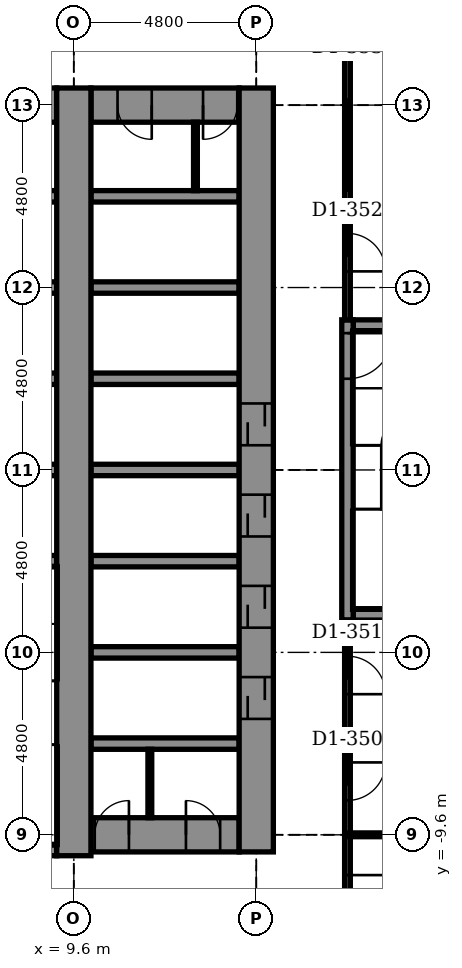
"""IFC4 building model, lengths in metres.
Left out: names, types, materials, properties, quantities, classifications, styles, units other than length and angle.
Written with IfcOpenShell. Run it as: python <this file> out.ifc"""

import sys

from ifc_helpers import new_model, si_unit, direction, frame, frame_2d, origin, place, context, subcontext, project, spatial, rectangle, extrude, element, fill, save


model = new_model("IFC4")
c1 = context("Model", 3, precision=1e-05, world=origin(), true_north=direction((0.0, 1.0)))
c2 = subcontext(c1, "Body", "Model", "MODEL_VIEW")
j1 = project(units=[si_unit("LENGTHUNIT", "METRE"), si_unit("PLANEANGLEUNIT", "RADIAN")], contexts=[c1])
p1 = place(None, origin())
s1 = spatial("IfcSite", under=j1, at=p1, CompositionType="ELEMENT")
p2 = place(p1, origin())
s2 = spatial("IfcBuilding", under=s1, at=p2, CompositionType="ELEMENT")
p3 = place(p2, frame((0.0, 0.0, 122.9)))
s3 = spatial("IfcBuildingStorey", under=s2, at=p3, CompositionType="ELEMENT", Elevation=122.9)
p4 = place(p3, frame((4.95, -10.0, -0.2), z_axis=(0.0, 0.0, 1.0), x_axis=(1.0, 0.0, 0.0)))
e1 = element("IfcWall", 1, at=p4, inside=s3, PredefinedType="STANDARD", context=c2, shape_type="SweptSolid", body=[
    extrude(rectangle(XDim=4.2, YDim=0.3, at=frame_2d((2.1, 0.0))), origin(), (0.0, 0.0, 1.0), 4.4),
])
p5 = place(p3, frame((10.05, -9.6, -0.2), z_axis=(0.0, 0.0, 1.0), x_axis=(1.0, 0.0, 0.0)))
e2 = element("IfcWall", 2, at=p5, inside=s3, PredefinedType="SHEAR", context=c2, shape_type="SweptSolid", body=[
    extrude(rectangle(XDim=3.9, YDim=0.9, at=frame_2d((1.95, 0.0))), origin(), (0.0, 0.0, 1.0), 4.4),
])
p6 = place(p5, frame((0.1, 0.0, 0.2)))
e3 = element("IfcOpeningElement", 3, at=p6, cuts=e2, PredefinedType="OPENING", context=c2, shape_type="SweptSolid", body=[
    extrude(rectangle(XDim=0.9, YDim=2.1, at=frame_2d((0.45, 1.05))), frame((0.0, 0.46, 0.0), z_axis=(0.0, -1.0, 0.0), x_axis=(1.0, 0.0, 0.0)), (0.0, 0.0, 1.0), 0.92),
])
p7 = place(p5, frame((2.5, 0.0, 0.2)))
e4 = element("IfcOpeningElement", 4, at=p7, cuts=e2, PredefinedType="OPENING", context=c2, shape_type="SweptSolid", body=[
    extrude(rectangle(XDim=0.9, YDim=2.1, at=frame_2d((0.45, 1.05))), frame((0.0, 0.46, 0.0), z_axis=(0.0, -1.0, 0.0), x_axis=(1.0, 0.0, 0.0)), (0.0, 0.0, 1.0), 0.92),
])
for number, where, z_axis, x_axis in (
    (5, (10.05, -7.2, -0.2), (0.0, 0.0, 1.0), (1.0, 0.0, 0.0)),
    (6, (10.05, -4.8, -0.2), (0.0, 0.0, 1.0), (1.0, 0.0, 0.0)),
):
    element("IfcWall", number, at=place(p3, frame(where, z_axis=z_axis, x_axis=x_axis)), inside=s3, PredefinedType="STANDARD", context=c2, shape_type="SweptSolid", body=[
        extrude(rectangle(XDim=3.9, YDim=0.3, at=frame_2d((1.95, 0.0))), origin(), (0.0, 0.0, 1.0), 4.4),
    ])
p8 = place(p3, frame((16.95, -3.8, -0.2), z_axis=(0.0, 0.0, 1.0), x_axis=(1.0, 0.0, 0.0)))
e7 = element("IfcWall", 7, at=p8, inside=s3, PredefinedType="STANDARD", context=c2, shape_type="SweptSolid", body=[
    extrude(rectangle(XDim=4.5, YDim=0.3, at=frame_2d((2.25, 0.0))), origin(), (0.0, 0.0, 1.0), 4.4),
])
p9 = place(p3, frame((6.15, -2.4, -0.2), z_axis=(0.0, 0.0, 1.0), x_axis=(1.0, 0.0, 0.0)))
e8 = element("IfcWall", 8, at=p9, inside=s3, PredefinedType="STANDARD", context=c2, shape_type="SweptSolid", body=[
    extrude(rectangle(XDim=3.0, YDim=0.3, at=frame_2d((1.5, 0.0))), origin(), (0.0, 0.0, 1.0), 4.4),
])
p10 = place(p3, frame((10.05, -2.4, -0.2), z_axis=(0.0, 0.0, 1.0), x_axis=(1.0, 0.0, 0.0)))
e9 = element("IfcWall", 9, at=p10, inside=s3, PredefinedType="STANDARD", context=c2, shape_type="SweptSolid", body=[
    extrude(rectangle(XDim=3.9, YDim=0.3, at=frame_2d((1.95, 0.0))), origin(), (0.0, 0.0, 1.0), 4.4),
])
p11 = place(p3, frame((6.15, 0.0, -0.2), z_axis=(0.0, 0.0, 1.0), x_axis=(1.0, 0.0, 0.0)))
e10 = element("IfcWall", 10, at=p11, inside=s3, PredefinedType="STANDARD", context=c2, shape_type="SweptSolid", body=[
    extrude(rectangle(XDim=3.0, YDim=0.3, at=frame_2d((1.5, 0.0))), origin(), (0.0, 0.0, 1.0), 4.4),
])
p12 = place(p3, frame((10.05, 0.0, -0.2), z_axis=(0.0, 0.0, 1.0), x_axis=(1.0, 0.0, 0.0)))
e11 = element("IfcWall", 11, at=p12, inside=s3, PredefinedType="STANDARD", context=c2, shape_type="SweptSolid", body=[
    extrude(rectangle(XDim=3.9, YDim=0.3, at=frame_2d((1.95, 0.0))), origin(), (0.0, 0.0, 1.0), 4.4),
])
p13 = place(p3, frame((6.15, 2.4, -0.2), z_axis=(0.0, 0.0, 1.0), x_axis=(1.0, 0.0, 0.0)))
e12 = element("IfcWall", 12, at=p13, inside=s3, PredefinedType="STANDARD", context=c2, shape_type="SweptSolid", body=[
    extrude(rectangle(XDim=3.0, YDim=0.3, at=frame_2d((1.5, 0.0))), origin(), (0.0, 0.0, 1.0), 4.4),
])
p14 = place(p3, frame((10.05, 2.4, -0.2), z_axis=(0.0, 0.0, 1.0), x_axis=(1.0, 0.0, 0.0)))
e13 = element("IfcWall", 13, at=p14, inside=s3, PredefinedType="STANDARD", context=c2, shape_type="SweptSolid", body=[
    extrude(rectangle(XDim=3.9, YDim=0.3, at=frame_2d((1.95, 0.0))), origin(), (0.0, 0.0, 1.0), 4.4),
])
p15 = place(p3, frame((16.95, 3.8, -0.2), z_axis=(0.0, 0.0, 1.0), x_axis=(1.0, 0.0, 0.0)))
e14 = element("IfcWall", 14, at=p15, inside=s3, PredefinedType="STANDARD", context=c2, shape_type="SweptSolid", body=[
    extrude(rectangle(XDim=4.5, YDim=0.3, at=frame_2d((2.25, 0.0))), origin(), (0.0, 0.0, 1.0), 4.4),
])
p16 = place(p3, frame((6.15, 4.8, -0.2), z_axis=(0.0, 0.0, 1.0), x_axis=(1.0, 0.0, 0.0)))
e15 = element("IfcWall", 15, at=p16, inside=s3, PredefinedType="STANDARD", context=c2, shape_type="SweptSolid", body=[
    extrude(rectangle(XDim=3.0, YDim=0.3, at=frame_2d((1.5, 0.0))), origin(), (0.0, 0.0, 1.0), 4.4),
])
p17 = place(p3, frame((10.05, 4.8, -0.2), z_axis=(0.0, 0.0, 1.0), x_axis=(1.0, 0.0, 0.0)))
e16 = element("IfcWall", 16, at=p17, inside=s3, PredefinedType="STANDARD", context=c2, shape_type="SweptSolid", body=[
    extrude(rectangle(XDim=3.9, YDim=0.3, at=frame_2d((1.95, 0.0))), origin(), (0.0, 0.0, 1.0), 4.4),
])
p18 = place(p3, frame((6.0, 7.2, -0.2), z_axis=(0.0, 0.0, 1.0), x_axis=(1.0, 0.0, 0.0)))
e17 = element("IfcWall", 17, at=p18, inside=s3, PredefinedType="STANDARD", context=c2, shape_type="SweptSolid", body=[
    extrude(rectangle(XDim=3.15, YDim=0.3, at=frame_2d((1.575, 0.0))), origin(), (0.0, 0.0, 1.0), 4.4),
])
p19 = place(p3, frame((10.05, 7.2, -0.2), z_axis=(0.0, 0.0, 1.0), x_axis=(1.0, 0.0, 0.0)))
e18 = element("IfcWall", 18, at=p19, inside=s3, PredefinedType="STANDARD", context=c2, shape_type="SweptSolid", body=[
    extrude(rectangle(XDim=3.9, YDim=0.3, at=frame_2d((1.95, 0.0))), origin(), (0.0, 0.0, 1.0), 4.4),
])
p20 = place(p3, frame((-5.25, 9.6, -0.2), z_axis=(0.0, 0.0, 1.0), x_axis=(1.0, 0.0, 0.0)))
e19 = element("IfcWall", 19, at=p20, inside=s3, PredefinedType="SHEAR", context=c2, shape_type="SweptSolid", body=[
    extrude(rectangle(XDim=14.4, YDim=0.9, at=frame_2d((7.2, 0.0))), origin(), (0.0, 0.0, 1.0), 4.4),
])
p21 = place(p20, frame((0.6, 0.0, 0.2)))
e20 = element("IfcOpeningElement", 20, at=p21, cuts=e19, PredefinedType="OPENING", context=c2, shape_type="SweptSolid", body=[
    extrude(rectangle(XDim=0.9, YDim=2.1, at=frame_2d((0.45, 1.05))), frame((0.0, 0.46, 0.0), z_axis=(0.0, -1.0, 0.0), x_axis=(1.0, 0.0, 0.0)), (0.0, 0.0, 1.0), 0.92),
])
p22 = place(p3, frame((10.05, 9.6, -0.2), z_axis=(0.0, 0.0, 1.0), x_axis=(1.0, 0.0, 0.0)))
e21 = element("IfcWall", 21, at=p22, inside=s3, PredefinedType="SHEAR", context=c2, shape_type="SweptSolid", body=[
    extrude(rectangle(XDim=3.9, YDim=0.9, at=frame_2d((1.95, 0.0))), origin(), (0.0, 0.0, 1.0), 4.4),
])
p23 = place(p22, frame((0.7, 0.0, 0.2)))
e22 = element("IfcOpeningElement", 22, at=p23, cuts=e21, PredefinedType="OPENING", context=c2, shape_type="SweptSolid", body=[
    extrude(rectangle(XDim=0.9, YDim=2.1, at=frame_2d((0.45, 1.05))), frame((0.0, 0.46, 0.0), z_axis=(0.0, -1.0, 0.0), x_axis=(1.0, 0.0, 0.0)), (0.0, 0.0, 1.0), 0.92),
])
p24 = place(p22, frame((2.95, 0.0, 0.2)))
e23 = element("IfcOpeningElement", 23, at=p24, cuts=e21, PredefinedType="OPENING", context=c2, shape_type="SweptSolid", body=[
    extrude(rectangle(XDim=0.9, YDim=2.1, at=frame_2d((0.45, 1.05))), frame((0.0, 0.46, 0.0), z_axis=(0.0, -1.0, 0.0), x_axis=(1.0, 0.0, 0.0)), (0.0, 0.0, 1.0), 0.92),
])
p25 = place(p3, frame((9.6, -10.15, -0.2), z_axis=(0.0, 0.0, 1.0), x_axis=(0.0, 1.0, 0.0)))
e24 = element("IfcWall", 24, at=p25, inside=s3, PredefinedType="SHEAR", context=c2, shape_type="SweptSolid", body=[
    extrude(rectangle(XDim=20.2, YDim=0.9, at=frame_2d((10.1, 0.0))), origin(), (0.0, 0.0, 1.0), 4.4),
])
p26 = place(p3, frame((14.4, -10.05, -0.2), z_axis=(0.0, 0.0, 1.0), x_axis=(0.0, 1.0, 0.0)))
e25 = element("IfcWall", 25, at=p26, inside=s3, PredefinedType="SHEAR", context=c2, shape_type="SweptSolid", body=[
    extrude(rectangle(XDim=20.1, YDim=0.9, at=frame_2d((10.05, 0.0))), origin(), (0.0, 0.0, 1.0), 4.4),
])
p27 = place(p26, frame((3.5, 0.0, 0.2)))
e26 = element("IfcOpeningElement", 26, at=p27, cuts=e25, PredefinedType="OPENING", context=c2, shape_type="SweptSolid", body=[
    extrude(rectangle(XDim=1.1, YDim=2.1, at=frame_2d((0.55, 1.05))), frame((0.0, 0.46, 0.0), z_axis=(0.0, -1.0, 0.0), x_axis=(1.0, 0.0, 0.0)), (0.0, 0.0, 1.0), 0.92),
])
p28 = place(p26, frame((5.9, 0.0, 0.2)))
e27 = element("IfcOpeningElement", 27, at=p28, cuts=e25, PredefinedType="OPENING", context=c2, shape_type="SweptSolid", body=[
    extrude(rectangle(XDim=1.1, YDim=2.1, at=frame_2d((0.55, 1.05))), frame((0.0, 0.46, 0.0), z_axis=(0.0, -1.0, 0.0), x_axis=(1.0, 0.0, 0.0)), (0.0, 0.0, 1.0), 0.92),
])
p29 = place(p26, frame((8.3, 0.0, 0.2)))
e28 = element("IfcOpeningElement", 28, at=p29, cuts=e25, PredefinedType="OPENING", context=c2, shape_type="SweptSolid", body=[
    extrude(rectangle(XDim=1.1, YDim=2.1, at=frame_2d((0.55, 1.05))), frame((0.0, 0.46, 0.0), z_axis=(0.0, -1.0, 0.0), x_axis=(1.0, 0.0, 0.0)), (0.0, 0.0, 1.0), 0.92),
])
p30 = place(p26, frame((10.7, 0.0, 0.2)))
e29 = element("IfcOpeningElement", 29, at=p30, cuts=e25, PredefinedType="OPENING", context=c2, shape_type="SweptSolid", body=[
    extrude(rectangle(XDim=1.1, YDim=2.1, at=frame_2d((0.55, 1.05))), frame((0.0, 0.46, 0.0), z_axis=(0.0, -1.0, 0.0), x_axis=(1.0, 0.0, 0.0)), (0.0, 0.0, 1.0), 0.92),
])
p31 = place(p3, frame((16.8, -3.95, -0.2), z_axis=(0.0, 0.0, 1.0), x_axis=(0.0, 1.0, 0.0)))
e30 = element("IfcWall", 30, at=p31, inside=s3, PredefinedType="STANDARD", context=c2, shape_type="SweptSolid", body=[
    extrude(rectangle(XDim=7.9, YDim=0.3, at=frame_2d((3.95, 0.0))), origin(), (0.0, 0.0, 1.0), 4.4),
])
p32 = place(p31, frame((6.35, 0.0, 0.2)))
e31 = element("IfcOpeningElement", 31, at=p32, cuts=e30, PredefinedType="OPENING", context=c2, shape_type="SweptSolid", body=[
    extrude(rectangle(XDim=1.2, YDim=2.1, at=frame_2d((0.6, 1.05))), frame((0.0, 0.16, 0.0), z_axis=(0.0, -1.0, 0.0), x_axis=(1.0, 0.0, 0.0)), (0.0, 0.0, 1.0), 0.32),
])
p33 = place(p3, frame((16.8, -13.3, 0.0), z_axis=(0.0, 0.0, 1.0), x_axis=(0.0, 1.0, 0.0)))
e32 = element("IfcWall", 32, at=p33, inside=s3, PredefinedType="PARTITIONING", context=c2, shape_type="SweptSolid", body=[
    extrude(rectangle(XDim=9.35, YDim=0.15, at=frame_2d((4.675, 0.0))), origin(), (0.0, 0.0, 1.0), 4.2),
])
p34 = place(p33, frame((1.64, 0.0, 0.0)))
e33 = element("IfcOpeningElement", 33, at=p34, cuts=e32, PredefinedType="OPENING", context=c2, shape_type="SweptSolid", body=[
    extrude(rectangle(XDim=1.0, YDim=2.1, at=frame_2d((0.5, 1.05))), frame((0.0, 0.085, 0.0), z_axis=(0.0, -1.0, 0.0), x_axis=(1.0, 0.0, 0.0)), (0.0, 0.0, 1.0), 0.17),
])
p35 = place(p33, frame((4.605, 0.0, 0.0)))
e34 = element("IfcOpeningElement", 34, at=p35, cuts=e32, PredefinedType="OPENING", context=c2, shape_type="SweptSolid", body=[
    extrude(rectangle(XDim=1.0, YDim=2.1, at=frame_2d((0.5, 1.05))), frame((0.0, 0.085, 0.0), z_axis=(0.0, -1.0, 0.0), x_axis=(1.0, 0.0, 0.0)), (0.0, 0.0, 1.0), 0.17),
])
p36 = place(p33, frame((7.4, 0.0, 0.0)))
e35 = element("IfcOpeningElement", 35, at=p36, cuts=e32, PredefinedType="OPENING", context=c2, shape_type="SweptSolid", body=[
    extrude(rectangle(XDim=1.0, YDim=2.1, at=frame_2d((0.5, 1.05))), frame((0.0, 0.085, 0.0), z_axis=(0.0, -1.0, 0.0), x_axis=(1.0, 0.0, 0.0)), (0.0, 0.0, 1.0), 0.17),
])
p37 = place(p3, frame((16.8, 3.95, 0.0), z_axis=(0.0, 0.0, 1.0), x_axis=(0.0, 1.0, 0.0)))
e36 = element("IfcWall", 36, at=p37, inside=s3, PredefinedType="PARTITIONING", context=c2, shape_type="SweptSolid", body=[
    extrude(rectangle(XDim=9.35, YDim=0.15, at=frame_2d((4.675, 0.0))), origin(), (0.0, 0.0, 1.0), 4.2),
])
p38 = place(p37, frame((1.275, 0.0, 0.0)))
e37 = element("IfcOpeningElement", 37, at=p38, cuts=e36, PredefinedType="OPENING", context=c2, shape_type="SweptSolid", body=[
    extrude(rectangle(XDim=1.0, YDim=2.1, at=frame_2d((0.5, 1.05))), frame((0.0, 0.085, 0.0), z_axis=(0.0, -1.0, 0.0), x_axis=(1.0, 0.0, 0.0)), (0.0, 0.0, 1.0), 0.17),
])
p39 = place(p37, frame((7.76, 0.0, 0.0)))
e38 = element("IfcOpeningElement", 38, at=p39, cuts=e36, PredefinedType="OPENING", context=c2, shape_type="SweptSolid", body=[
    extrude(rectangle(XDim=1.0, YDim=2.1, at=frame_2d((0.5, 1.05))), frame((0.0, 0.085, 0.0), z_axis=(0.0, -1.0, 0.0), x_axis=(1.0, 0.0, 0.0)), (0.0, 0.0, 1.0), 0.17),
])
p40 = place(p37, frame((3.4, 0.0, 0.9)))
e39 = element("IfcOpeningElement", 39, at=p40, cuts=e36, PredefinedType="OPENING", context=c2, shape_type="SweptSolid", body=[
    extrude(rectangle(XDim=2.4, YDim=1.5, at=frame_2d((1.2, 0.75))), frame((0.0, 0.085, 0.0), z_axis=(0.0, -1.0, 0.0), x_axis=(1.0, 0.0, 0.0)), (0.0, 0.0, 1.0), 0.17),
])
for number, where, z_axis, x_axis in (
    (40, (12.8, 7.35, 0.0), (0.0, 0.0, 1.0), (0.0, 1.0, 0.0)),
    (41, (11.6, -9.15, 0.0), (0.0, 0.0, 1.0), (0.0, 1.0, 0.0)),
):
    element("IfcWall", number, at=place(p3, frame(where, z_axis=z_axis, x_axis=x_axis)), inside=s3, PredefinedType="PARTITIONING", context=c2, shape_type="SweptSolid", body=[
        extrude(rectangle(XDim=1.8, YDim=0.1, at=frame_2d((0.9, 0.0))), origin(), (0.0, 0.0, 1.0), 4.2),
    ])
p41 = place(p3, frame((16.8, -9.6, 0.0), z_axis=(0.0, 0.0, 1.0), x_axis=(1.0, 0.0, 0.0)))
e42 = element("IfcWall", 42, at=p41, inside=s3, PredefinedType="PARTITIONING", context=c2, shape_type="SweptSolid", body=[
    extrude(rectangle(XDim=1.9, YDim=0.1, at=frame_2d((0.95, 0.0))), origin(), (0.0, 0.0, 1.0), 3.592),
])
p42 = place(p3, frame((16.8, -7.0, 0.0), z_axis=(0.0, 0.0, 1.0), x_axis=(1.0, 0.0, 0.0)))
e43 = element("IfcWall", 43, at=p42, inside=s3, PredefinedType="PARTITIONING", context=c2, shape_type="SweptSolid", body=[
    extrude(rectangle(XDim=10.888, YDim=0.1, at=frame_2d((5.444, 0.0))), origin(), (0.0, 0.0, 1.0), 4.2),
])
p43 = place(p3, frame((16.8, 11.0, 0.0), z_axis=(0.0, 0.0, 1.0), x_axis=(1.0, 0.0, 0.0)))
e44 = element("IfcWall", 44, at=p43, inside=s3, PredefinedType="PARTITIONING", context=c2, shape_type="SweptSolid", body=[
    extrude(rectangle(XDim=8.578, YDim=0.1, at=frame_2d((4.289, 0.0))), origin(), (0.0, 0.0, 1.0), 4.2),
])
p44 = place(p34, frame((1.0, 0.0, 0.0), z_axis=(0.0, 0.0, 1.0), x_axis=(-1.0, 0.0, 0.0)))
e45 = element("IfcDoor", 45, at=p44, inside=s3, OperationType="SINGLE_SWING_RIGHT", PredefinedType="DOOR", context=c2, shape_type="SweptSolid", body=[
    extrude(rectangle(XDim=1.0, YDim=2.1, at=frame_2d((0.5, 1.05))), frame((0.0, 0.025, 0.0), z_axis=(0.0, -1.0, 0.0), x_axis=(1.0, 0.0, 0.0)), (0.0, 0.0, 1.0), 0.05),
])
fill(e33, e45)
p45 = place(p35, frame((1.0, 0.0, 0.0), z_axis=(0.0, 0.0, 1.0), x_axis=(-1.0, 0.0, 0.0)))
e46 = element("IfcDoor", 46, at=p45, inside=s3, OperationType="SINGLE_SWING_RIGHT", PredefinedType="DOOR", context=c2, shape_type="SweptSolid", body=[
    extrude(rectangle(XDim=1.0, YDim=2.1, at=frame_2d((0.5, 1.05))), frame((0.0, 0.025, 0.0), z_axis=(0.0, -1.0, 0.0), x_axis=(1.0, 0.0, 0.0)), (0.0, 0.0, 1.0), 0.05),
])
fill(e34, e46)
p46 = place(p36, frame((1.0, 0.0, 0.0), z_axis=(0.0, 0.0, 1.0), x_axis=(-1.0, 0.0, 0.0)))
e47 = element("IfcDoor", 47, at=p46, inside=s3, OperationType="SINGLE_SWING_LEFT", PredefinedType="DOOR", context=c2, shape_type="SweptSolid", body=[
    extrude(rectangle(XDim=1.0, YDim=2.1, at=frame_2d((0.5, 1.05))), frame((0.0, 0.025, 0.0), z_axis=(0.0, -1.0, 0.0), x_axis=(1.0, 0.0, 0.0)), (0.0, 0.0, 1.0), 0.05),
])
fill(e35, e47)
p47 = place(p38, frame((1.0, 0.0, 0.0), z_axis=(0.0, 0.0, 1.0), x_axis=(-1.0, 0.0, 0.0)))
e48 = element("IfcDoor", 48, at=p47, inside=s3, OperationType="SINGLE_SWING_LEFT", PredefinedType="DOOR", context=c2, shape_type="SweptSolid", body=[
    extrude(rectangle(XDim=1.0, YDim=2.1, at=frame_2d((0.5, 1.05))), frame((0.0, 0.025, 0.0), z_axis=(0.0, -1.0, 0.0), x_axis=(1.0, 0.0, 0.0)), (0.0, 0.0, 1.0), 0.05),
])
fill(e37, e48)
p48 = place(p27, origin())
e49 = element("IfcDoor", 49, at=p48, inside=s3, OperationType="DOUBLE_DOOR_SLIDING", PredefinedType="DOOR", context=c2, shape_type="SweptSolid", body=[
    extrude(rectangle(XDim=1.1, YDim=2.1, at=frame_2d((0.55, 1.05))), frame((0.0, 0.025, 0.0), z_axis=(0.0, -1.0, 0.0), x_axis=(1.0, 0.0, 0.0)), (0.0, 0.0, 1.0), 0.05),
])
fill(e26, e49)
p49 = place(p28, origin())
e50 = element("IfcDoor", 50, at=p49, inside=s3, OperationType="DOUBLE_DOOR_SLIDING", PredefinedType="DOOR", context=c2, shape_type="SweptSolid", body=[
    extrude(rectangle(XDim=1.1, YDim=2.1, at=frame_2d((0.55, 1.05))), frame((0.0, 0.025, 0.0), z_axis=(0.0, -1.0, 0.0), x_axis=(1.0, 0.0, 0.0)), (0.0, 0.0, 1.0), 0.05),
])
fill(e27, e50)
p50 = place(p29, origin())
e51 = element("IfcDoor", 51, at=p50, inside=s3, OperationType="DOUBLE_DOOR_SLIDING", PredefinedType="DOOR", context=c2, shape_type="SweptSolid", body=[
    extrude(rectangle(XDim=1.1, YDim=2.1, at=frame_2d((0.55, 1.05))), frame((0.0, 0.025, 0.0), z_axis=(0.0, -1.0, 0.0), x_axis=(1.0, 0.0, 0.0)), (0.0, 0.0, 1.0), 0.05),
])
fill(e28, e51)
p51 = place(p30, origin())
e52 = element("IfcDoor", 52, at=p51, inside=s3, OperationType="DOUBLE_DOOR_SLIDING", PredefinedType="DOOR", context=c2, shape_type="SweptSolid", body=[
    extrude(rectangle(XDim=1.1, YDim=2.1, at=frame_2d((0.55, 1.05))), frame((0.0, 0.025, 0.0), z_axis=(0.0, -1.0, 0.0), x_axis=(1.0, 0.0, 0.0)), (0.0, 0.0, 1.0), 0.05),
])
fill(e29, e52)
p52 = place(p32, frame((1.2, 0.0, 0.0), z_axis=(0.0, 0.0, 1.0), x_axis=(-1.0, 0.0, 0.0)))
e53 = element("IfcDoor", 53, at=p52, inside=s3, OperationType="SINGLE_SWING_RIGHT", PredefinedType="DOOR", context=c2, shape_type="SweptSolid", body=[
    extrude(rectangle(XDim=1.2, YDim=2.1, at=frame_2d((0.6, 1.05))), frame((0.0, 0.025, 0.0), z_axis=(0.0, -1.0, 0.0), x_axis=(1.0, 0.0, 0.0)), (0.0, 0.0, 1.0), 0.05),
])
fill(e31, e53)
p53 = place(p6, origin())
e54 = element("IfcDoor", 54, at=p53, inside=s3, OperationType="SINGLE_SWING_RIGHT", PredefinedType="DOOR", context=c2, shape_type="SweptSolid", body=[
    extrude(rectangle(XDim=0.9, YDim=2.1, at=frame_2d((0.45, 1.05))), frame((0.0, 0.025, 0.0), z_axis=(0.0, -1.0, 0.0), x_axis=(1.0, 0.0, 0.0)), (0.0, 0.0, 1.0), 0.05),
])
fill(e3, e54)
p54 = place(p7, origin())
e55 = element("IfcDoor", 55, at=p54, inside=s3, OperationType="SINGLE_SWING_LEFT", PredefinedType="DOOR", context=c2, shape_type="SweptSolid", body=[
    extrude(rectangle(XDim=0.9, YDim=2.1, at=frame_2d((0.45, 1.05))), frame((0.0, 0.025, 0.0), z_axis=(0.0, -1.0, 0.0), x_axis=(1.0, 0.0, 0.0)), (0.0, 0.0, 1.0), 0.05),
])
fill(e4, e55)
p55 = place(p23, frame((0.9, 0.0, 0.0), z_axis=(0.0, 0.0, 1.0), x_axis=(-1.0, 0.0, 0.0)))
e56 = element("IfcDoor", 56, at=p55, inside=s3, OperationType="SINGLE_SWING_RIGHT", PredefinedType="DOOR", context=c2, shape_type="SweptSolid", body=[
    extrude(rectangle(XDim=0.9, YDim=2.1, at=frame_2d((0.45, 1.05))), frame((0.0, 0.025, 0.0), z_axis=(0.0, -1.0, 0.0), x_axis=(1.0, 0.0, 0.0)), (0.0, 0.0, 1.0), 0.05),
])
fill(e22, e56)
p56 = place(p24, frame((0.9, 0.0, 0.0), z_axis=(0.0, 0.0, 1.0), x_axis=(-1.0, 0.0, 0.0)))
e57 = element("IfcDoor", 57, at=p56, inside=s3, OperationType="SINGLE_SWING_LEFT", PredefinedType="DOOR", context=c2, shape_type="SweptSolid", body=[
    extrude(rectangle(XDim=0.9, YDim=2.1, at=frame_2d((0.45, 1.05))), frame((0.0, 0.025, 0.0), z_axis=(0.0, -1.0, 0.0), x_axis=(1.0, 0.0, 0.0)), (0.0, 0.0, 1.0), 0.05),
])
fill(e23, e57)
p57 = place(p40, origin())
e58 = element("IfcWindow", 58, at=p57, inside=s3, PartitioningType="SINGLE_PANEL", PredefinedType="WINDOW", context=c2, shape_type="SweptSolid", body=[
    extrude(rectangle(XDim=2.4, YDim=1.5, at=frame_2d((1.2, 0.75))), frame((0.0, 0.03, 0.0), z_axis=(0.0, -1.0, 0.0), x_axis=(1.0, 0.0, 0.0)), (0.0, 0.0, 1.0), 0.06),
])
fill(e39, e58)
save(model, sys.argv[1])
